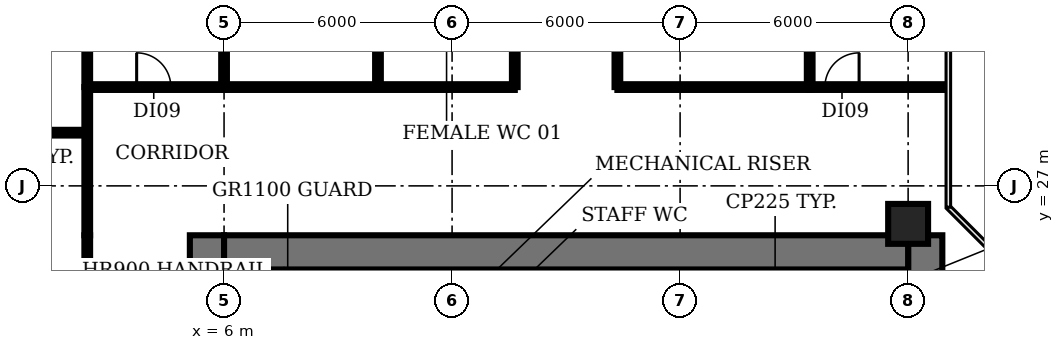
"""IFC4 building model, lengths in metres.
Left out: names, types, materials, properties, quantities, classifications, styles, units other than length and angle.
Written with IfcOpenShell. Run it as: python <this file> out.ifc"""

import sys

from ifc_helpers import new_model, si_unit, direction, frame, frame_2d, origin, origin_2d, place, context, subcontext, project, spatial, rectangle, circle, extrude, element, fill, save


model = new_model("IFC4")
c1 = context("Model", 3, precision=1e-05, world=origin(), true_north=direction((0.0, 1.0)))
c2 = subcontext(c1, "Body", "Model", "MODEL_VIEW")
j1 = project(units=[si_unit("LENGTHUNIT", "METRE"), si_unit("PLANEANGLEUNIT", "RADIAN")], contexts=[c1])
p1 = place(None, origin())
s1 = spatial("IfcSite", under=j1, at=p1, CompositionType="ELEMENT")
p2 = place(p1, origin())
s2 = spatial("IfcBuilding", under=s1, at=p2, CompositionType="ELEMENT")
p3 = place(p2, frame((0.0, 0.0, 62.6)))
s3 = spatial("IfcBuildingStorey", under=s2, at=p3, CompositionType="ELEMENT", Elevation=62.6)
p4 = place(p3, frame((24.0, 26.0, 0.0), z_axis=(0.0, 0.0, 1.0), x_axis=(1.0, 0.0, 0.0)))
e1 = element("IfcColumn", 1, at=p4, inside=s3, PredefinedType="COLUMN", context=c2, shape_type="SweptSolid", body=[
    extrude(circle(Radius=0.525, at=origin_2d()), origin(), (0.0, 0.0, 1.0), 3.85),
])
p5 = place(p3, frame((9.275, 18.375, 0.0), z_axis=(0.0, 0.0, 1.0), x_axis=(0.0, 1.0, 0.0)))
e2 = element("IfcWall", 2, at=p5, inside=s3, PredefinedType="SHEAR", context=c2, shape_type="SweptSolid", body=[
    extrude(rectangle(XDim=6.425, YDim=0.25, at=frame_2d((3.212, 0.0))), origin(), (0.0, 0.0, 1.0), 3.85),
])
for number, where, z_axis, x_axis in (
    (3, (15.1, 22.9, 0.0), (0.0, 0.0, 1.0), (0.0, 1.0, 0.0)),
    (4, (20.7, 22.9, 0.0), (0.0, 0.0, 1.0), (0.0, 1.0, 0.0)),
):
    element("IfcWall", number, at=place(p3, frame(where, z_axis=z_axis, x_axis=x_axis)), inside=s3, PredefinedType="SHEAR", context=c2, shape_type="SweptSolid", body=[
        extrude(rectangle(XDim=1.9, YDim=0.2, at=frame_2d((0.95, 0.0))), origin(), (0.0, 0.0, 1.0), 3.85),
    ])
p6 = place(p3, frame((5.55, 4.5, 0.0), z_axis=(0.0, 0.0, 1.0), x_axis=(0.0, 1.0, 0.0)))
e5 = element("IfcWall", 5, at=p6, inside=s3, PredefinedType="SHEAR", context=c2, shape_type="SweptSolid", body=[
    extrude(rectangle(XDim=21.2, YDim=0.9, at=frame_2d((10.6, 0.0))), origin(), (0.0, 0.0, 1.0), 3.85),
])
p7 = place(p6, frame((1.15, 0.0, 0.0)))
e6 = element("IfcOpeningElement", 6, at=p7, cuts=e5, PredefinedType="OPENING", context=c2, shape_type="SweptSolid", body=[
    extrude(rectangle(XDim=1.5, YDim=2.1, at=frame_2d((0.75, 1.05))), frame((0.0, 0.46, 0.0), z_axis=(0.0, -1.0, 0.0), x_axis=(1.0, 0.0, 0.0)), (0.0, 0.0, 1.0), 0.92),
])
p8 = place(p6, frame((7.6, 0.0, 0.0)))
e7 = element("IfcOpeningElement", 7, at=p8, cuts=e5, PredefinedType="OPENING", context=c2, shape_type="SweptSolid", body=[
    extrude(rectangle(XDim=1.2, YDim=2.1, at=frame_2d((0.6, 1.05))), frame((0.0, 0.46, 0.0), z_axis=(0.0, -1.0, 0.0), x_axis=(1.0, 0.0, 0.0)), (0.0, 0.0, 1.0), 0.92),
])
p9 = place(p6, frame((14.15, 0.0, 0.0)))
e8 = element("IfcOpeningElement", 8, at=p9, cuts=e5, PredefinedType="OPENING", context=c2, shape_type="SweptSolid", body=[
    extrude(rectangle(XDim=1.2, YDim=2.1, at=frame_2d((0.6, 1.05))), frame((0.0, 0.46, 0.0), z_axis=(0.0, -1.0, 0.0), x_axis=(1.0, 0.0, 0.0)), (0.0, 0.0, 1.0), 0.92),
])
p10 = place(p3, frame((24.45, 25.7, 0.0), z_axis=(0.0, 0.0, 1.0), x_axis=(0.0, -1.0, 0.0)))
e9 = element("IfcWall", 9, at=p10, inside=s3, PredefinedType="SHEAR", context=c2, shape_type="SweptSolid", body=[
    extrude(rectangle(XDim=21.2, YDim=0.9, at=frame_2d((10.6, 0.0))), origin(), (0.0, 0.0, 1.0), 3.85),
])
p11 = place(p10, frame((18.55, 0.0, 0.0)))
e10 = element("IfcOpeningElement", 10, at=p11, cuts=e9, PredefinedType="OPENING", context=c2, shape_type="SweptSolid", body=[
    extrude(rectangle(XDim=1.5, YDim=2.1, at=frame_2d((0.75, 1.05))), frame((0.0, 0.46, 0.0), z_axis=(0.0, -1.0, 0.0), x_axis=(1.0, 0.0, 0.0)), (0.0, 0.0, 1.0), 0.92),
])
p12 = place(p10, frame((12.45, 0.0, 0.0)))
e11 = element("IfcOpeningElement", 11, at=p12, cuts=e9, PredefinedType="OPENING", context=c2, shape_type="SweptSolid", body=[
    extrude(rectangle(XDim=0.9, YDim=2.1, at=frame_2d((0.45, 1.05))), frame((0.0, 0.46, 0.0), z_axis=(0.0, -1.0, 0.0), x_axis=(1.0, 0.0, 0.0)), (0.0, 0.0, 1.0), 0.92),
])
p13 = place(p10, frame((6.45, 0.0, 0.0)))
e12 = element("IfcOpeningElement", 12, at=p13, cuts=e9, PredefinedType="OPENING", context=c2, shape_type="SweptSolid", body=[
    extrude(rectangle(XDim=2.0, YDim=2.1, at=frame_2d((1.0, 1.05))), frame((0.0, 0.46, 0.0), z_axis=(0.0, -1.0, 0.0), x_axis=(1.0, 0.0, 0.0)), (0.0, 0.0, 1.0), 0.92),
])
p14 = place(p3, frame((6.0, 25.25, 0.0), z_axis=(0.0, 0.0, 1.0), x_axis=(1.0, 0.0, 0.0)))
e13 = element("IfcWall", 13, at=p14, inside=s3, PredefinedType="SHEAR", context=c2, shape_type="SweptSolid", body=[
    extrude(rectangle(XDim=18.0, YDim=0.9, at=frame_2d((9.0, 0.0))), origin(), (0.0, 0.0, 1.0), 3.85),
])
p15 = place(p3, frame((-1.01, 28.4, 0.0), z_axis=(0.0, 0.0, 1.0), x_axis=(1.0, 0.0, 0.0)))
e14 = element("IfcWall", 14, at=p15, inside=s3, PredefinedType="PARTITIONING", context=c2, shape_type="SweptSolid", body=[
    extrude(rectangle(XDim=3.41, YDim=0.15, at=frame_2d((1.705, 0.0))), origin(), (0.0, 0.0, 1.0), 2.83),
])
p16 = place(p3, frame((2.4, 4.5, 0.0), z_axis=(0.0, 0.0, 1.0), x_axis=(0.0, 1.0, 0.0)))
e15 = element("IfcWall", 15, at=p16, inside=s3, PredefinedType="PARTITIONING", context=c2, shape_type="SweptSolid", body=[
    extrude(rectangle(XDim=21.2, YDim=0.15, at=frame_2d((10.6, 0.0))), origin(), (0.0, 0.0, 1.0), 2.83),
])
p17 = place(p16, frame((10.8, 0.0, 0.0)))
e16 = element("IfcOpeningElement", 16, at=p17, cuts=e15, PredefinedType="OPENING", context=c2, shape_type="SweptSolid", body=[
    extrude(rectangle(XDim=1.2, YDim=2.1, at=frame_2d((0.6, 1.05))), frame((0.0, 0.085, 0.0), z_axis=(0.0, -1.0, 0.0), x_axis=(1.0, 0.0, 0.0)), (0.0, 0.0, 1.0), 0.17),
])
p18 = place(p3, frame((2.4, 25.7, 0.0), z_axis=(0.0, 0.0, 1.0), x_axis=(0.0, 1.0, 0.0)))
e17 = element("IfcWall", 17, at=p18, inside=s3, PredefinedType="PARTITIONING", context=c2, shape_type="SweptSolid", body=[
    extrude(rectangle(XDim=3.9, YDim=0.15, at=frame_2d((1.95, 0.0))), origin(), (0.0, 0.0, 1.0), 2.83),
])
p19 = place(p3, frame((2.4, 29.6, 0.0), z_axis=(0.0, 0.0, 1.0), x_axis=(0.0, 1.0, 0.0)))
e18 = element("IfcWall", 18, at=p19, inside=s3, PredefinedType="PARTITIONING", context=c2, shape_type="SweptSolid", body=[
    extrude(rectangle(XDim=4.8, YDim=0.15, at=frame_2d((2.4, 0.0))), origin(), (0.0, 0.0, 1.0), 2.83),
])
p20 = place(p3, frame((2.4, 29.6, 0.0), z_axis=(0.0, 0.0, 1.0), x_axis=(1.0, 0.0, 0.0)))
e19 = element("IfcWall", 19, at=p20, inside=s3, PredefinedType="PARTITIONING", context=c2, shape_type="SweptSolid", body=[
    extrude(rectangle(XDim=3.6, YDim=0.15, at=frame_2d((1.8, 0.0))), origin(), (0.0, 0.0, 1.0), 2.83),
])
p21 = place(p20, frame((1.3, 0.0, 0.0)))
e20 = element("IfcOpeningElement", 20, at=p21, cuts=e19, PredefinedType="OPENING", context=c2, shape_type="SweptSolid", body=[
    extrude(rectangle(XDim=0.9, YDim=2.1, at=frame_2d((0.45, 1.05))), frame((0.0, 0.085, 0.0), z_axis=(0.0, -1.0, 0.0), x_axis=(1.0, 0.0, 0.0)), (0.0, 0.0, 1.0), 0.17),
])
p22 = place(p3, frame((6.0, 29.6, 0.0), z_axis=(0.0, 0.0, 1.0), x_axis=(0.0, 1.0, 0.0)))
e21 = element("IfcWall", 21, at=p22, inside=s3, PredefinedType="PARTITIONING", context=c2, shape_type="SweptSolid", body=[
    extrude(rectangle(XDim=4.8, YDim=0.15, at=frame_2d((2.4, 0.0))), origin(), (0.0, 0.0, 1.0), 2.83),
])
p23 = place(p3, frame((6.0, 29.6, 0.0), z_axis=(0.0, 0.0, 1.0), x_axis=(1.0, 0.0, 0.0)))
e22 = element("IfcWall", 22, at=p23, inside=s3, PredefinedType="PARTITIONING", context=c2, shape_type="SweptSolid", body=[
    extrude(rectangle(XDim=7.65, YDim=0.15, at=frame_2d((3.825, 0.0))), origin(), (0.0, 0.0, 1.0), 2.83),
])
p24 = place(p3, frame((10.05, 29.6, 0.0), z_axis=(0.0, 0.0, 1.0), x_axis=(0.0, 1.0, 0.0)))
e23 = element("IfcWall", 23, at=p24, inside=s3, PredefinedType="PARTITIONING", context=c2, shape_type="SweptSolid", body=[
    extrude(rectangle(XDim=4.8, YDim=0.15, at=frame_2d((2.4, 0.0))), origin(), (0.0, 0.0, 1.0), 2.83),
])
p25 = place(p3, frame((13.65, 29.6, 0.0), z_axis=(0.0, 0.0, 1.0), x_axis=(0.0, 1.0, 0.0)))
e24 = element("IfcWall", 24, at=p25, inside=s3, PredefinedType="PARTITIONING", context=c2, shape_type="SweptSolid", body=[
    extrude(rectangle(XDim=4.8, YDim=0.15, at=frame_2d((2.4, 0.0))), origin(), (0.0, 0.0, 1.0), 2.83),
])
p26 = place(p25, frame((1.9, 0.0, 0.0)))
e25 = element("IfcOpeningElement", 25, at=p26, cuts=e24, PredefinedType="OPENING", context=c2, shape_type="SweptSolid", body=[
    extrude(rectangle(XDim=0.9, YDim=2.1, at=frame_2d((0.45, 1.05))), frame((0.0, 0.085, 0.0), z_axis=(0.0, -1.0, 0.0), x_axis=(1.0, 0.0, 0.0)), (0.0, 0.0, 1.0), 0.17),
])
p27 = place(p3, frame((16.35, 29.6, 0.0), z_axis=(0.0, 0.0, 1.0), x_axis=(0.0, 1.0, 0.0)))
e26 = element("IfcWall", 26, at=p27, inside=s3, PredefinedType="PARTITIONING", context=c2, shape_type="SweptSolid", body=[
    extrude(rectangle(XDim=4.8, YDim=0.15, at=frame_2d((2.4, 0.0))), origin(), (0.0, 0.0, 1.0), 2.83),
])
p28 = place(p3, frame((16.35, 29.6, 0.0), z_axis=(0.0, 0.0, 1.0), x_axis=(1.0, 0.0, 0.0)))
e27 = element("IfcWall", 27, at=p28, inside=s3, PredefinedType="PARTITIONING", context=c2, shape_type="SweptSolid", body=[
    extrude(rectangle(XDim=5.06, YDim=0.15, at=frame_2d((2.53, 0.0))), origin(), (0.0, 0.0, 1.0), 2.83),
])
p29 = place(p3, frame((21.41, 29.6, 0.0), z_axis=(0.0, 0.0, 1.0), x_axis=(0.0, 1.0, 0.0)))
e28 = element("IfcWall", 28, at=p29, inside=s3, PredefinedType="PARTITIONING", context=c2, shape_type="SweptSolid", body=[
    extrude(rectangle(XDim=4.8, YDim=0.15, at=frame_2d((2.4, 0.0))), origin(), (0.0, 0.0, 1.0), 2.83),
])
p30 = place(p3, frame((21.41, 29.6, 0.0), z_axis=(0.0, 0.0, 1.0), x_axis=(1.0, 0.0, 0.0)))
e29 = element("IfcWall", 29, at=p30, inside=s3, PredefinedType="PARTITIONING", context=c2, shape_type="SweptSolid", body=[
    extrude(rectangle(XDim=3.6, YDim=0.15, at=frame_2d((1.8, 0.0))), origin(), (0.0, 0.0, 1.0), 2.83),
])
p31 = place(p30, frame((0.4, 0.0, 0.0)))
e30 = element("IfcOpeningElement", 30, at=p31, cuts=e29, PredefinedType="OPENING", context=c2, shape_type="SweptSolid", body=[
    extrude(rectangle(XDim=0.9, YDim=2.1, at=frame_2d((0.45, 1.05))), frame((0.0, 0.085, 0.0), z_axis=(0.0, -1.0, 0.0), x_axis=(1.0, 0.0, 0.0)), (0.0, 0.0, 1.0), 0.17),
])
p32 = place(p21, origin())
e31 = element("IfcDoor", 31, at=p32, inside=s3, OperationType="SINGLE_SWING_LEFT", PredefinedType="DOOR", context=c2, shape_type="SweptSolid", body=[
    extrude(rectangle(XDim=0.9, YDim=2.1, at=frame_2d((0.45, 1.05))), frame((0.0, 0.025, 0.0), z_axis=(0.0, -1.0, 0.0), x_axis=(1.0, 0.0, 0.0)), (0.0, 0.0, 1.0), 0.05),
])
fill(e20, e31)
p33 = place(p31, origin())
e32 = element("IfcDoor", 32, at=p33, inside=s3, OperationType="SINGLE_SWING_RIGHT", PredefinedType="DOOR", context=c2, shape_type="SweptSolid", body=[
    extrude(rectangle(XDim=0.9, YDim=2.1, at=frame_2d((0.45, 1.05))), frame((0.0, 0.025, 0.0), z_axis=(0.0, -1.0, 0.0), x_axis=(1.0, 0.0, 0.0)), (0.0, 0.0, 1.0), 0.05),
])
fill(e30, e32)
save(model, sys.argv[1])
